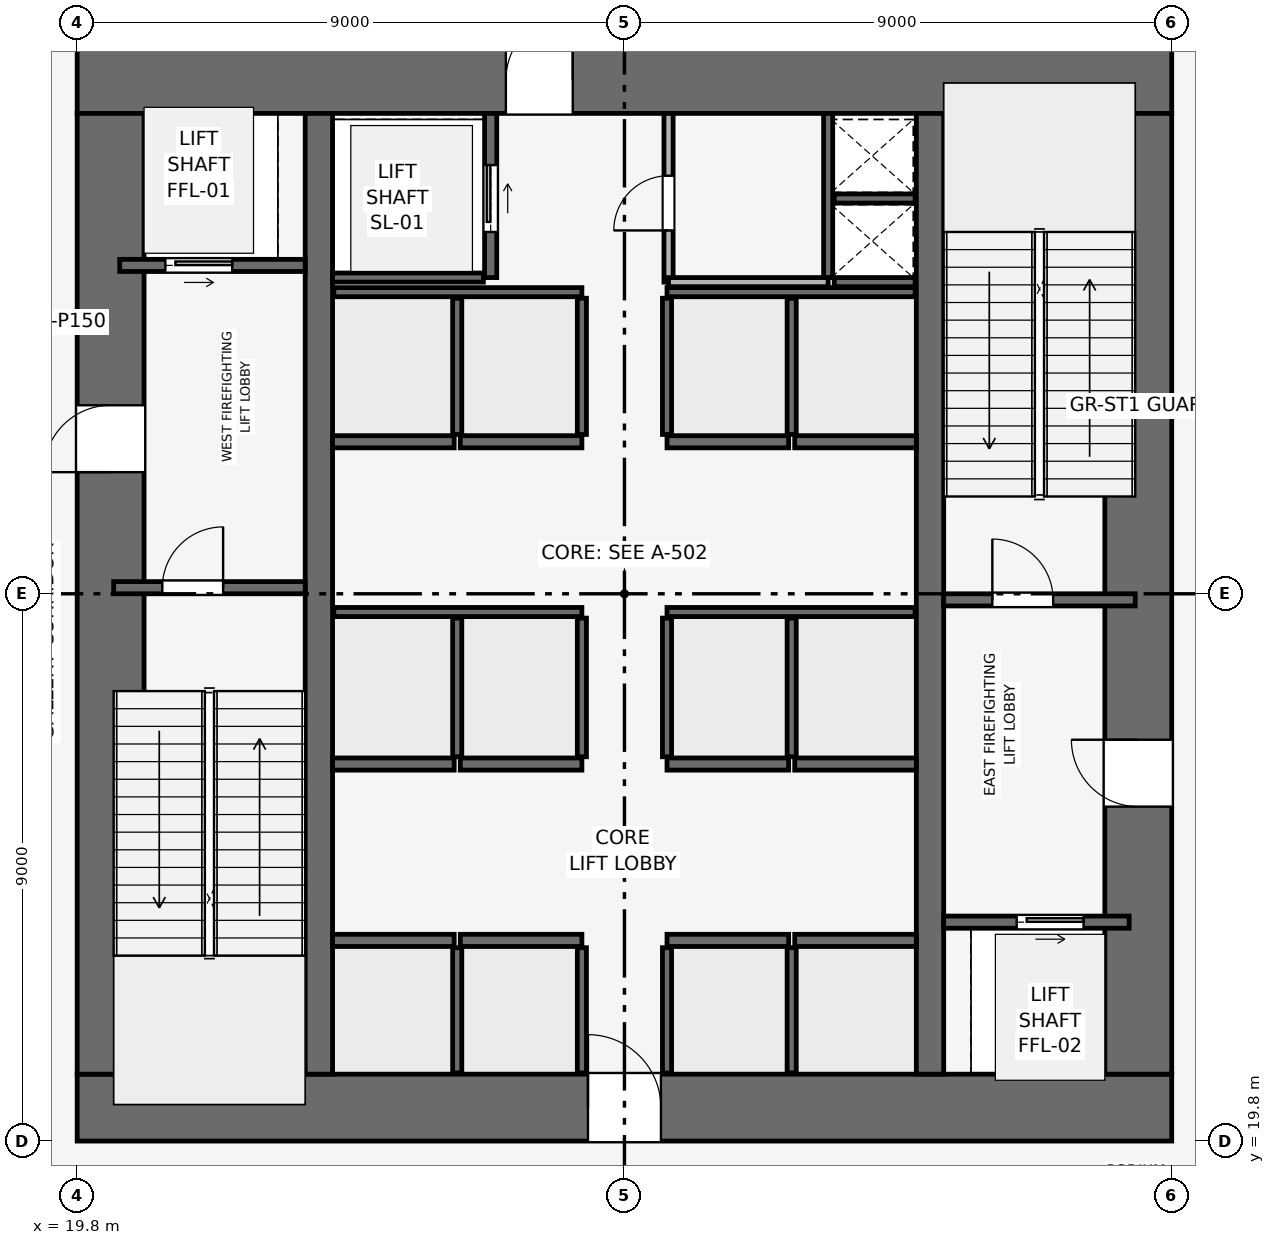
"""IFC4 building model, lengths in metres.
Left out: names, types, materials, properties, quantities, classifications, styles, units other than length and angle.
Written with IfcOpenShell. Run it as: python <this file> out.ifc"""

import sys

from ifc_helpers import new_model, si_unit, direction, frame, frame_2d, origin, place, context, subcontext, project, spatial, rectangle, extrude, element, fill, save


model = new_model("IFC4")
c1 = context("Model", 3, precision=1e-05, world=origin(), true_north=direction((0.0, 1.0)))
c2 = subcontext(c1, "Body", "Model", "MODEL_VIEW")
j1 = project(units=[si_unit("LENGTHUNIT", "METRE"), si_unit("PLANEANGLEUNIT", "RADIAN")], contexts=[c1])
p1 = place(None, origin())
s1 = spatial("IfcSite", under=j1, at=p1, CompositionType="ELEMENT")
p2 = place(p1, origin())
s2 = spatial("IfcBuilding", under=s1, at=p2, CompositionType="ELEMENT")
p3 = place(p2, frame((0.0, 0.0, 8.4)))
s3 = spatial("IfcBuildingStorey", under=s2, at=p3, CompositionType="ELEMENT", Elevation=8.4)
p4 = place(p3, frame((19.8, 20.35, 0.0), z_axis=(0.0, 0.0, 1.0), x_axis=(1.0, 0.0, 0.0)))
e1 = element("IfcWall", 1, at=p4, inside=s3, PredefinedType="SHEAR", context=c2, shape_type="SweptSolid", body=[
    extrude(rectangle(XDim=18.0, YDim=1.1, at=frame_2d((9.0, 0.0))), origin(), (0.0, 0.0, 1.0), 5.4),
])
p5 = place(p4, frame((8.4, 0.0, 0.0)))
e2 = element("IfcOpeningElement", 2, at=p5, cuts=e1, PredefinedType="OPENING", context=c2, shape_type="SweptSolid", body=[
    extrude(rectangle(XDim=1.2, YDim=2.2, at=frame_2d((0.6, 1.1))), frame((0.0, 0.56, 0.0), z_axis=(0.0, -1.0, 0.0), x_axis=(1.0, 0.0, 0.0)), (0.0, 0.0, 1.0), 1.12),
])
p6 = place(p3, frame((19.8, 37.25, 0.0), z_axis=(0.0, 0.0, 1.0), x_axis=(1.0, 0.0, 0.0)))
e3 = element("IfcWall", 3, at=p6, inside=s3, PredefinedType="SHEAR", context=c2, shape_type="SweptSolid", body=[
    extrude(rectangle(XDim=18.0, YDim=1.1, at=frame_2d((9.0, 0.0))), origin(), (0.0, 0.0, 1.0), 5.4),
])
p7 = place(p6, frame((7.05, 0.0, 0.0)))
e4 = element("IfcOpeningElement", 4, at=p7, cuts=e3, PredefinedType="OPENING", context=c2, shape_type="SweptSolid", body=[
    extrude(rectangle(XDim=1.1, YDim=2.15, at=frame_2d((0.55, 1.075))), frame((0.0, 0.56, 0.0), z_axis=(0.0, -1.0, 0.0), x_axis=(1.0, 0.0, 0.0)), (0.0, 0.0, 1.0), 1.12),
])
p8 = place(p3, frame((20.35, 20.9, 0.0), z_axis=(0.0, 0.0, 1.0), x_axis=(0.0, 1.0, 0.0)))
e5 = element("IfcWall", 5, at=p8, inside=s3, PredefinedType="SHEAR", context=c2, shape_type="SweptSolid", body=[
    extrude(rectangle(XDim=15.8, YDim=1.1, at=frame_2d((7.9, 0.0))), origin(), (0.0, 0.0, 1.0), 5.4),
])
p9 = place(p8, frame((9.9, 0.0, 0.0)))
e6 = element("IfcOpeningElement", 6, at=p9, cuts=e5, PredefinedType="OPENING", context=c2, shape_type="SweptSolid", body=[
    extrude(rectangle(XDim=1.1, YDim=2.15, at=frame_2d((0.55, 1.075))), frame((0.0, 0.56, 0.0), z_axis=(0.0, -1.0, 0.0), x_axis=(1.0, 0.0, 0.0)), (0.0, 0.0, 1.0), 1.12),
])
p10 = place(p3, frame((37.25, 20.9, 0.0), z_axis=(0.0, 0.0, 1.0), x_axis=(0.0, 1.0, 0.0)))
e7 = element("IfcWall", 7, at=p10, inside=s3, PredefinedType="SHEAR", context=c2, shape_type="SweptSolid", body=[
    extrude(rectangle(XDim=15.8, YDim=1.1, at=frame_2d((7.9, 0.0))), origin(), (0.0, 0.0, 1.0), 5.4),
])
p11 = place(p10, frame((4.4, 0.0, 0.0)))
e8 = element("IfcOpeningElement", 8, at=p11, cuts=e7, PredefinedType="OPENING", context=c2, shape_type="SweptSolid", body=[
    extrude(rectangle(XDim=1.1, YDim=2.15, at=frame_2d((0.55, 1.075))), frame((0.0, 0.56, 0.0), z_axis=(0.0, -1.0, 0.0), x_axis=(1.0, 0.0, 0.0)), (0.0, 0.0, 1.0), 1.12),
])
for number, where, z_axis, x_axis in (
    (9, (23.775, 20.9, 0.0), (0.0, 0.0, 1.0), (0.0, 1.0, 0.0)),
    (10, (33.825, 20.9, 0.0), (0.0, 0.0, 1.0), (0.0, 1.0, 0.0)),
):
    element("IfcWall", number, at=place(p3, frame(where, z_axis=z_axis, x_axis=x_axis)), inside=s3, PredefinedType="SHEAR", context=c2, shape_type="SweptSolid", body=[
        extrude(rectangle(XDim=15.8, YDim=0.45, at=frame_2d((7.9, 0.0))), origin(), (0.0, 0.0, 1.0), 5.4),
    ])
p12 = place(p3, frame((20.4, 28.9, 0.0), z_axis=(0.0, 0.0, 1.0), x_axis=(1.0, 0.0, 0.0)))
e11 = element("IfcWall", 11, at=p12, inside=s3, PredefinedType="SHEAR", context=c2, shape_type="SweptSolid", body=[
    extrude(rectangle(XDim=3.15, YDim=0.2, at=frame_2d((1.575, 0.0))), origin(), (0.0, 0.0, 1.0), 5.05),
])
p13 = place(p12, frame((0.8, 0.0, 0.0)))
e12 = element("IfcOpeningElement", 12, at=p13, cuts=e11, PredefinedType="OPENING", context=c2, shape_type="SweptSolid", body=[
    extrude(rectangle(XDim=1.0, YDim=2.1, at=frame_2d((0.5, 1.05))), frame((0.0, 0.11, 0.0), z_axis=(0.0, -1.0, 0.0), x_axis=(1.0, 0.0, 0.0)), (0.0, 0.0, 1.0), 0.22),
])
p14 = place(p3, frame((34.05, 28.7, 0.0), z_axis=(0.0, 0.0, 1.0), x_axis=(1.0, 0.0, 0.0)))
e13 = element("IfcWall", 13, at=p14, inside=s3, PredefinedType="SHEAR", context=c2, shape_type="SweptSolid", body=[
    extrude(rectangle(XDim=3.15, YDim=0.2, at=frame_2d((1.575, 0.0))), origin(), (0.0, 0.0, 1.0), 5.05),
])
p15 = place(p14, frame((0.8, 0.0, 0.0)))
e14 = element("IfcOpeningElement", 14, at=p15, cuts=e13, PredefinedType="OPENING", context=c2, shape_type="SweptSolid", body=[
    extrude(rectangle(XDim=1.0, YDim=2.1, at=frame_2d((0.5, 1.05))), frame((0.0, 0.11, 0.0), z_axis=(0.0, -1.0, 0.0), x_axis=(1.0, 0.0, 0.0)), (0.0, 0.0, 1.0), 0.22),
])
p16 = place(p3, frame((32.15, 34.0, 0.0), z_axis=(0.0, 0.0, 1.0), x_axis=(0.0, 1.0, 0.0)))
e15 = element("IfcWall", 15, at=p16, inside=s3, PredefinedType="SHEAR", context=c2, shape_type="SweptSolid", body=[
    extrude(rectangle(XDim=2.7, YDim=0.15, at=frame_2d((1.35, 0.0))), origin(), (0.0, 0.0, 1.0), 5.05),
])
for number, where, z_axis, x_axis in (
    (16, (32.25, 33.925, 0.0), (0.0, 0.0, 1.0), (1.0, 0.0, 0.0)),
    (17, (32.25, 35.3, 0.0), (0.0, 0.0, 1.0), (1.0, 0.0, 0.0)),
):
    element("IfcWall", number, at=place(p3, frame(where, z_axis=z_axis, x_axis=x_axis)), inside=s3, PredefinedType="SHEAR", context=c2, shape_type="SweptSolid", body=[
        extrude(rectangle(XDim=1.33, YDim=0.15, at=frame_2d((0.665, 0.0))), origin(), (0.0, 0.0, 1.0), 5.05),
    ])
p17 = place(p3, frame((20.5, 34.2, 0.0), z_axis=(0.0, 0.0, 1.0), x_axis=(1.0, 0.0, 0.0)))
e18 = element("IfcWall", 18, at=p17, inside=s3, PredefinedType="SHEAR", context=c2, shape_type="SweptSolid", body=[
    extrude(rectangle(XDim=3.05, YDim=0.2, at=frame_2d((1.525, 0.0))), origin(), (0.0, 0.0, 1.0), 5.05),
])
p18 = place(p17, frame((0.75, 0.0, 0.0)))
e19 = element("IfcOpeningElement", 19, at=p18, cuts=e18, PredefinedType="OPENING", context=c2, shape_type="SweptSolid", body=[
    extrude(rectangle(XDim=1.1, YDim=2.15, at=frame_2d((0.55, 1.075))), frame((0.0, 0.11, 0.0), z_axis=(0.0, -1.0, 0.0), x_axis=(1.0, 0.0, 0.0)), (0.0, 0.0, 1.0), 0.22),
])
p19 = place(p3, frame((34.05, 23.4, 0.0), z_axis=(0.0, 0.0, 1.0), x_axis=(1.0, 0.0, 0.0)))
e20 = element("IfcWall", 20, at=p19, inside=s3, PredefinedType="SHEAR", context=c2, shape_type="SweptSolid", body=[
    extrude(rectangle(XDim=3.05, YDim=0.2, at=frame_2d((1.525, 0.0))), origin(), (0.0, 0.0, 1.0), 5.05),
])
p20 = place(p19, frame((1.2, 0.0, 0.0)))
e21 = element("IfcOpeningElement", 21, at=p20, cuts=e20, PredefinedType="OPENING", context=c2, shape_type="SweptSolid", body=[
    extrude(rectangle(XDim=1.1, YDim=2.15, at=frame_2d((0.55, 1.075))), frame((0.0, 0.11, 0.0), z_axis=(0.0, -1.0, 0.0), x_axis=(1.0, 0.0, 0.0)), (0.0, 0.0, 1.0), 0.22),
])
p21 = place(p3, frame((26.6, 34.0, 0.0), z_axis=(0.0, 0.0, 1.0), x_axis=(0.0, 1.0, 0.0)))
e22 = element("IfcWall", 22, at=p21, inside=s3, PredefinedType="SHEAR", context=c2, shape_type="SweptSolid", body=[
    extrude(rectangle(XDim=2.7, YDim=0.2, at=frame_2d((1.35, 0.0))), origin(), (0.0, 0.0, 1.0), 5.05),
])
p22 = place(p21, frame((0.75, 0.0, 0.0)))
e23 = element("IfcOpeningElement", 23, at=p22, cuts=e22, PredefinedType="OPENING", context=c2, shape_type="SweptSolid", body=[
    extrude(rectangle(XDim=1.1, YDim=2.15, at=frame_2d((0.55, 1.075))), frame((0.0, 0.11, 0.0), z_axis=(0.0, -1.0, 0.0), x_axis=(1.0, 0.0, 0.0)), (0.0, 0.0, 1.0), 0.22),
])
p23 = place(p3, frame((24.0, 34.0, 0.0), z_axis=(0.0, 0.0, 1.0), x_axis=(1.0, 0.0, 0.0)))
e24 = element("IfcWall", 24, at=p23, inside=s3, PredefinedType="SHEAR", context=c2, shape_type="SweptSolid", body=[
    extrude(rectangle(XDim=2.48, YDim=0.15, at=frame_2d((1.24, 0.0))), origin(), (0.0, 0.0, 1.0), 5.05),
])
for number, where, z_axis, x_axis in (
    (25, (24.0, 23.1, 0.0), (0.0, 0.0, 1.0), (1.0, 0.0, 0.0)),
    (26, (26.1, 23.1, 0.0), (0.0, 0.0, 1.0), (1.0, 0.0, 0.0)),
    (27, (29.5, 23.1, 0.0), (0.0, 0.0, 1.0), (1.0, 0.0, 0.0)),
    (28, (31.6, 23.1, 0.0), (0.0, 0.0, 1.0), (1.0, 0.0, 0.0)),
    (29, (24.0, 26.0, 0.0), (0.0, 0.0, 1.0), (1.0, 0.0, 0.0)),
    (30, (26.1, 26.0, 0.0), (0.0, 0.0, 1.0), (1.0, 0.0, 0.0)),
    (31, (29.5, 26.0, 0.0), (0.0, 0.0, 1.0), (1.0, 0.0, 0.0)),
    (32, (31.6, 26.0, 0.0), (0.0, 0.0, 1.0), (1.0, 0.0, 0.0)),
    (33, (24.0, 31.3, 0.0), (0.0, 0.0, 1.0), (1.0, 0.0, 0.0)),
    (34, (26.1, 31.3, 0.0), (0.0, 0.0, 1.0), (1.0, 0.0, 0.0)),
    (35, (29.5, 31.3, 0.0), (0.0, 0.0, 1.0), (1.0, 0.0, 0.0)),
    (36, (31.6, 31.3, 0.0), (0.0, 0.0, 1.0), (1.0, 0.0, 0.0)),
):
    element("IfcWall", number, at=place(p3, frame(where, z_axis=z_axis, x_axis=x_axis)), inside=s3, PredefinedType="SHEAR", context=c2, shape_type="SweptSolid", body=[
        extrude(rectangle(XDim=2.0, YDim=0.2, at=frame_2d((1.0, 0.0))), origin(), (0.0, 0.0, 1.0), 5.05),
    ])
for number, where, z_axis, x_axis in (
    (37, (26.05, 20.92, 0.0), (0.0, 0.0, 1.0), (0.0, 1.0, 0.0)),
    (38, (28.1, 20.92, 0.0), (0.0, 0.0, 1.0), (0.0, 1.0, 0.0)),
    (39, (29.5, 20.92, 0.0), (0.0, 0.0, 1.0), (0.0, 1.0, 0.0)),
    (40, (31.55, 20.92, 0.0), (0.0, 0.0, 1.0), (0.0, 1.0, 0.0)),
):
    element("IfcWall", number, at=place(p3, frame(where, z_axis=z_axis, x_axis=x_axis)), inside=s3, PredefinedType="SHEAR", context=c2, shape_type="SweptSolid", body=[
        extrude(rectangle(XDim=2.06, YDim=0.15, at=frame_2d((1.03, 0.0))), origin(), (0.0, 0.0, 1.0), 5.05),
    ])
for number, where, z_axis, x_axis in (
    (41, (24.02, 28.5, 0.0), (0.0, 0.0, 1.0), (1.0, 0.0, 0.0)),
    (42, (29.5, 28.5, 0.0), (0.0, 0.0, 1.0), (1.0, 0.0, 0.0)),
):
    element("IfcWall", number, at=place(p3, frame(where, z_axis=z_axis, x_axis=x_axis)), inside=s3, PredefinedType="SHEAR", context=c2, shape_type="SweptSolid", body=[
        extrude(rectangle(XDim=4.08, YDim=0.15, at=frame_2d((2.04, 0.0))), origin(), (0.0, 0.0, 1.0), 5.05),
    ])
for number, where, z_axis, x_axis in (
    (43, (26.05, 26.12, 0.0), (0.0, 0.0, 1.0), (0.0, 1.0, 0.0)),
    (44, (28.1, 26.12, 0.0), (0.0, 0.0, 1.0), (0.0, 1.0, 0.0)),
    (45, (29.5, 26.12, 0.0), (0.0, 0.0, 1.0), (0.0, 1.0, 0.0)),
    (46, (31.55, 26.12, 0.0), (0.0, 0.0, 1.0), (0.0, 1.0, 0.0)),
):
    element("IfcWall", number, at=place(p3, frame(where, z_axis=z_axis, x_axis=x_axis)), inside=s3, PredefinedType="SHEAR", context=c2, shape_type="SweptSolid", body=[
        extrude(rectangle(XDim=2.28, YDim=0.15, at=frame_2d((1.14, 0.0))), origin(), (0.0, 0.0, 1.0), 5.05),
    ])
for number, where, z_axis, x_axis in (
    (47, (24.02, 33.76, 0.0), (0.0, 0.0, 1.0), (1.0, 0.0, 0.0)),
    (48, (29.5, 33.76, 0.0), (0.0, 0.0, 1.0), (1.0, 0.0, 0.0)),
):
    element("IfcWall", number, at=place(p3, frame(where, z_axis=z_axis, x_axis=x_axis)), inside=s3, PredefinedType="SHEAR", context=c2, shape_type="SweptSolid", body=[
        extrude(rectangle(XDim=4.08, YDim=0.15, at=frame_2d((2.04, 0.0))), origin(), (0.0, 0.0, 1.0), 5.05),
    ])
for number, where, z_axis, x_axis in (
    (49, (26.05, 31.42, 0.0), (0.0, 0.0, 1.0), (0.0, 1.0, 0.0)),
    (50, (28.1, 31.42, 0.0), (0.0, 0.0, 1.0), (0.0, 1.0, 0.0)),
    (51, (29.5, 31.42, 0.0), (0.0, 0.0, 1.0), (0.0, 1.0, 0.0)),
    (52, (31.55, 31.42, 0.0), (0.0, 0.0, 1.0), (0.0, 1.0, 0.0)),
):
    element("IfcWall", number, at=place(p3, frame(where, z_axis=z_axis, x_axis=x_axis)), inside=s3, PredefinedType="SHEAR", context=c2, shape_type="SweptSolid", body=[
        extrude(rectangle(XDim=2.24, YDim=0.15, at=frame_2d((1.12, 0.0))), origin(), (0.0, 0.0, 1.0), 5.05),
    ])
p24 = place(p3, frame((29.525, 33.925, 0.0), z_axis=(0.0, 0.0, 1.0), x_axis=(0.0, 1.0, 0.0)))
e53 = element("IfcWall", 53, at=p24, inside=s3, PredefinedType="PARTITIONING", context=c2, shape_type="SweptSolid", body=[
    extrude(rectangle(XDim=2.775, YDim=0.15, at=frame_2d((1.387, 0.0))), origin(), (0.0, 0.0, 1.0), 5.05),
])
p25 = place(p24, frame((0.85, 0.0, 0.0)))
e54 = element("IfcOpeningElement", 54, at=p25, cuts=e53, PredefinedType="OPENING", context=c2, shape_type="SweptSolid", body=[
    extrude(rectangle(XDim=0.9, YDim=2.1, at=frame_2d((0.45, 1.05))), frame((0.0, 0.085, 0.0), z_axis=(0.0, -1.0, 0.0), x_axis=(1.0, 0.0, 0.0)), (0.0, 0.0, 1.0), 0.17),
])
p26 = place(p3, frame((29.525, 33.925, 0.0), z_axis=(0.0, 0.0, 1.0), x_axis=(1.0, 0.0, 0.0)))
e55 = element("IfcWall", 55, at=p26, inside=s3, PredefinedType="PARTITIONING", context=c2, shape_type="SweptSolid", body=[
    extrude(rectangle(XDim=2.625, YDim=0.15, at=frame_2d((1.312, 0.0))), origin(), (0.0, 0.0, 1.0), 5.05),
])
p27 = place(p13, origin())
e56 = element("IfcDoor", 56, at=p27, inside=s3, OperationType="SINGLE_SWING_RIGHT", PredefinedType="DOOR", context=c2, shape_type="SweptSolid", body=[
    extrude(rectangle(XDim=1.0, YDim=2.1, at=frame_2d((0.5, 1.05))), frame((0.0, 0.025, 0.0), z_axis=(0.0, -1.0, 0.0), x_axis=(1.0, 0.0, 0.0)), (0.0, 0.0, 1.0), 0.05),
])
fill(e12, e56)
p28 = place(p15, origin())
e57 = element("IfcDoor", 57, at=p28, inside=s3, OperationType="SINGLE_SWING_LEFT", PredefinedType="DOOR", context=c2, shape_type="SweptSolid", body=[
    extrude(rectangle(XDim=1.0, YDim=2.1, at=frame_2d((0.5, 1.05))), frame((0.0, 0.025, 0.0), z_axis=(0.0, -1.0, 0.0), x_axis=(1.0, 0.0, 0.0)), (0.0, 0.0, 1.0), 0.05),
])
fill(e14, e57)
p29 = place(p18, origin())
e58 = element("IfcDoor", 58, at=p29, inside=s3, OperationType="SLIDING_TO_RIGHT", PredefinedType="DOOR", context=c2, shape_type="SweptSolid", body=[
    extrude(rectangle(XDim=1.1, YDim=2.15, at=frame_2d((0.55, 1.075))), frame((0.0, 0.025, 0.0), z_axis=(0.0, -1.0, 0.0), x_axis=(1.0, 0.0, 0.0)), (0.0, 0.0, 1.0), 0.05),
])
fill(e19, e58)
p30 = place(p20, origin())
e59 = element("IfcDoor", 59, at=p30, inside=s3, OperationType="SLIDING_TO_RIGHT", PredefinedType="DOOR", context=c2, shape_type="SweptSolid", body=[
    extrude(rectangle(XDim=1.1, YDim=2.15, at=frame_2d((0.55, 1.075))), frame((0.0, 0.025, 0.0), z_axis=(0.0, -1.0, 0.0), x_axis=(1.0, 0.0, 0.0)), (0.0, 0.0, 1.0), 0.05),
])
fill(e21, e59)
p31 = place(p22, origin())
e60 = element("IfcDoor", 60, at=p31, inside=s3, OperationType="SLIDING_TO_RIGHT", PredefinedType="DOOR", context=c2, shape_type="SweptSolid", body=[
    extrude(rectangle(XDim=1.1, YDim=2.15, at=frame_2d((0.55, 1.075))), frame((0.0, 0.025, 0.0), z_axis=(0.0, -1.0, 0.0), x_axis=(1.0, 0.0, 0.0)), (0.0, 0.0, 1.0), 0.05),
])
fill(e23, e60)
p32 = place(p25, origin())
e61 = element("IfcDoor", 61, at=p32, inside=s3, OperationType="SINGLE_SWING_LEFT", PredefinedType="DOOR", context=c2, shape_type="SweptSolid", body=[
    extrude(rectangle(XDim=0.9, YDim=2.1, at=frame_2d((0.45, 1.05))), frame((0.0, 0.025, 0.0), z_axis=(0.0, -1.0, 0.0), x_axis=(1.0, 0.0, 0.0)), (0.0, 0.0, 1.0), 0.05),
])
fill(e54, e61)
p33 = place(p9, origin())
e62 = element("IfcDoor", 62, at=p33, inside=s3, OperationType="SINGLE_SWING_LEFT", PredefinedType="DOOR", context=c2, shape_type="SweptSolid", body=[
    extrude(rectangle(XDim=1.1, YDim=2.15, at=frame_2d((0.55, 1.075))), frame((0.0, 0.025, 0.0), z_axis=(0.0, -1.0, 0.0), x_axis=(1.0, 0.0, 0.0)), (0.0, 0.0, 1.0), 0.05),
])
fill(e6, e62)
p34 = place(p11, origin())
e63 = element("IfcDoor", 63, at=p34, inside=s3, OperationType="SINGLE_SWING_RIGHT", PredefinedType="DOOR", context=c2, shape_type="SweptSolid", body=[
    extrude(rectangle(XDim=1.1, YDim=2.15, at=frame_2d((0.55, 1.075))), frame((0.0, 0.025, 0.0), z_axis=(0.0, -1.0, 0.0), x_axis=(1.0, 0.0, 0.0)), (0.0, 0.0, 1.0), 0.05),
])
fill(e8, e63)
p35 = place(p5, origin())
e64 = element("IfcDoor", 64, at=p35, inside=s3, OperationType="SINGLE_SWING_LEFT", PredefinedType="DOOR", context=c2, shape_type="SweptSolid", body=[
    extrude(rectangle(XDim=1.2, YDim=2.2, at=frame_2d((0.6, 1.1))), frame((0.0, 0.025, 0.0), z_axis=(0.0, -1.0, 0.0), x_axis=(1.0, 0.0, 0.0)), (0.0, 0.0, 1.0), 0.05),
])
fill(e2, e64)
p36 = place(p7, origin())
e65 = element("IfcDoor", 65, at=p36, inside=s3, OperationType="SINGLE_SWING_RIGHT", PredefinedType="DOOR", context=c2, shape_type="SweptSolid", body=[
    extrude(rectangle(XDim=1.1, YDim=2.15, at=frame_2d((0.55, 1.075))), frame((0.0, 0.025, 0.0), z_axis=(0.0, -1.0, 0.0), x_axis=(1.0, 0.0, 0.0)), (0.0, 0.0, 1.0), 0.05),
])
fill(e4, e65)
save(model, sys.argv[1])
